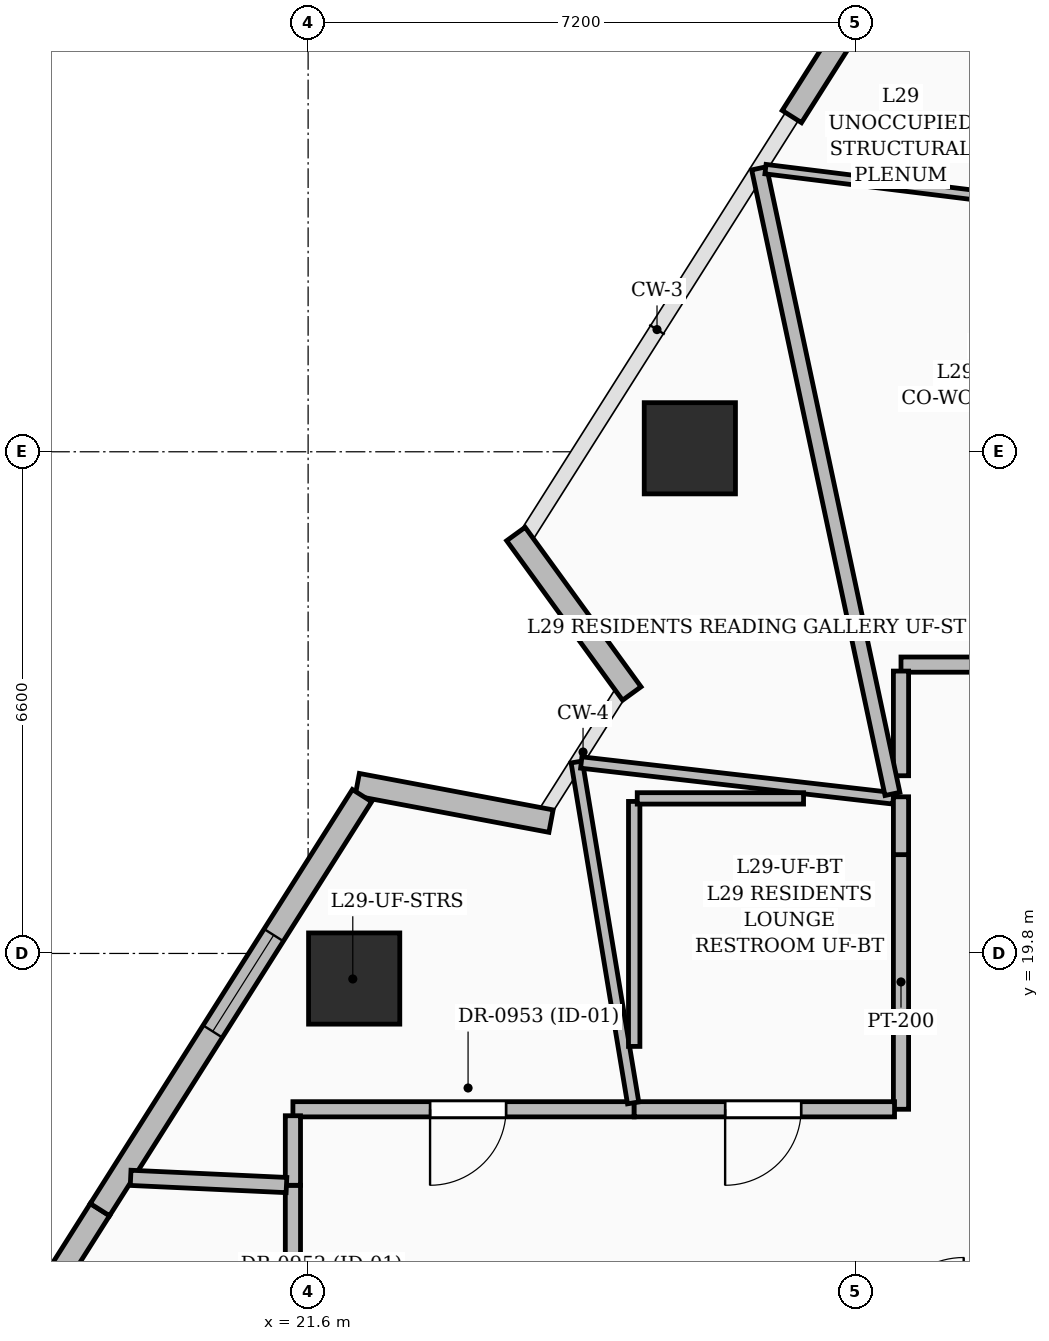
"""IFC4 building model, lengths in metres.
Left out: names, types, materials, properties, quantities, classifications, styles, units other than length and angle.
Written with IfcOpenShell. Run it as: python <this file> out.ifc"""

import sys

from ifc_helpers import new_model, si_unit, direction, frame, frame_2d, origin, origin_2d, place, context, subcontext, project, spatial, rectangle, extrude, element, fill, save


model = new_model("IFC4")
c1 = context("Model", 3, precision=1e-05, world=origin(), true_north=direction((0.0, 1.0)))
c2 = subcontext(c1, "Body", "Model", "MODEL_VIEW")
j1 = project(units=[si_unit("LENGTHUNIT", "METRE"), si_unit("PLANEANGLEUNIT", "RADIAN")], contexts=[c1])
p1 = place(None, origin())
s1 = spatial("IfcSite", under=j1, at=p1, CompositionType="ELEMENT")
p2 = place(p1, origin())
s2 = spatial("IfcBuilding", under=s1, at=p2, CompositionType="ELEMENT")
p3 = place(p2, frame((0.0, 0.0, 117.6)))
s3 = spatial("IfcBuildingStorey", under=s2, at=p3, CompositionType="ELEMENT", Elevation=117.6)
for number, where, z_axis, x_axis in (
    (1, (26.622, 26.446, 0.0), (0.0, 0.0, 1.0), (1.0, 0.0, 0.0)),
    (2, (22.206, 19.47, 0.0), (0.0, 0.0, 1.0), (1.0, 0.0, 0.0)),
):
    element("IfcColumn", number, at=place(p3, frame(where, z_axis=z_axis, x_axis=x_axis)), inside=s3, PredefinedType="COLUMN", context=c2, shape_type="SweptSolid", body=[
        extrude(rectangle(XDim=1.2, YDim=1.2, at=origin_2d()), origin(), (0.0, 0.0, 1.0), 3.6),
    ])
for number, where, z_axis, x_axis in (
    (3, (22.246, 22.021, 0.0), (0.0, 0.0, 1.0), (0.983, -0.185, 0.0)),
    (4, (25.858, 23.22, 0.0), (0.0, 0.0, 1.0), (-0.588, 0.809, 0.0)),
):
    element("IfcWall", number, at=place(p3, frame(where, z_axis=z_axis, x_axis=x_axis)), inside=s3, PredefinedType="SOLIDWALL", context=c2, shape_type="SweptSolid", body=[
        extrude(rectangle(XDim=2.594, YDim=0.3, at=frame_2d((1.297, 0.0))), origin(), (0.0, 0.0, 1.0), 2.575),
    ])
p4 = place(p3, frame((27.964, 30.81, 0.0), z_axis=(0.0, 0.0, 1.0), x_axis=(0.534892719091, 0.844919983823, 0.0)))
e5 = element("IfcWall", 5, at=p4, inside=s3, PredefinedType="SOLIDWALL", context=c2, shape_type="SweptSolid", body=[
    extrude(rectangle(XDim=6.634, YDim=0.3, at=frame_2d((3.317, 0.0))), origin(), (0.0, 0.0, 1.0), 3.35),
])
p5 = place(p4, frame((1.375, 0.0, 0.6)))
e6 = element("IfcOpeningElement", 6, at=p5, cuts=e5, PredefinedType="OPENING", context=c2, shape_type="SweptSolid", body=[
    extrude(rectangle(XDim=1.8, YDim=2.1, at=frame_2d((0.9, 1.05))), frame((0.0, 0.16, 0.0), z_axis=(0.0, -1.0, 0.0), x_axis=(1.0, 0.0, 0.0)), (0.0, 0.0, 1.0), 0.32),
])
p6 = place(p3, frame((15.262, 10.746, 0.0), z_axis=(0.0, 0.0, 1.0), x_axis=(0.534880248718, 0.844927878302, 0.0)))
e7 = element("IfcWall", 7, at=p6, inside=s3, PredefinedType="SOLIDWALL", context=c2, shape_type="SweptSolid", body=[
    extrude(rectangle(XDim=6.727, YDim=0.3, at=frame_2d((3.364, 0.0))), origin(), (0.0, 0.0, 1.0), 3.35),
])
p7 = place(p6, frame((3.975, 0.0, 0.55)))
e8 = element("IfcOpeningElement", 8, at=p7, cuts=e7, PredefinedType="OPENING", context=c2, shape_type="SweptSolid", body=[
    extrude(rectangle(XDim=1.6, YDim=2.2, at=frame_2d((0.8, 1.1))), frame((0.0, 0.16, 0.0), z_axis=(0.0, -1.0, 0.0), x_axis=(1.0, 0.0, 0.0)), (0.0, 0.0, 1.0), 0.32),
])
p8 = place(p6, frame((0.975, 0.0, 0.55)))
e9 = element("IfcOpeningElement", 9, at=p8, cuts=e7, PredefinedType="OPENING", context=c2, shape_type="SweptSolid", body=[
    extrude(rectangle(XDim=1.6, YDim=2.2, at=frame_2d((0.8, 1.1))), frame((0.0, 0.16, 0.0), z_axis=(0.0, -1.0, 0.0), x_axis=(1.0, 0.0, 0.0)), (0.0, 0.0, 1.0), 0.32),
])
p9 = place(p3, frame((18.861, 16.429, 0.0), z_axis=(0.0, 0.0, 1.0), x_axis=(0.534891708764, 0.844920623429, 0.0)))
e10 = element("IfcWall", 10, at=p9, inside=s3, PredefinedType="SOLIDWALL", context=c2, shape_type="SweptSolid", body=[
    extrude(rectangle(XDim=6.447, YDim=0.3, at=frame_2d((3.224, 0.0))), origin(), (0.0, 0.0, 1.0), 3.35),
])
p10 = place(p9, frame((2.775, 0.0, 0.6)))
e11 = element("IfcOpeningElement", 11, at=p10, cuts=e10, PredefinedType="OPENING", context=c2, shape_type="SweptSolid", body=[
    extrude(rectangle(XDim=1.5, YDim=2.1, at=frame_2d((0.75, 1.05))), frame((0.0, 0.16, 0.0), z_axis=(0.0, -1.0, 0.0), x_axis=(1.0, 0.0, 0.0)), (0.0, 0.0, 1.0), 0.32),
])
p11 = place(p3, frame((21.4, 16.75, 0.0), z_axis=(0.0, 0.0, 1.0), x_axis=(0.0, -1.0, 0.0)))
e12 = element("IfcWall", 12, at=p11, inside=s3, PredefinedType="PARTITIONING", context=c2, shape_type="SweptSolid", body=[
    extrude(rectangle(XDim=4.5, YDim=0.2, at=frame_2d((2.25, 0.0))), origin(), (0.0, 0.0, 1.0), 2.771),
])
p12 = place(p11, frame((1.69, 0.0, 0.0)))
e13 = element("IfcOpeningElement", 13, at=p12, cuts=e12, PredefinedType="OPENING", context=c2, shape_type="SweptSolid", body=[
    extrude(rectangle(XDim=1.0, YDim=2.2, at=frame_2d((0.5, 1.1))), frame((0.0, 0.11, 0.0), z_axis=(0.0, -1.0, 0.0), x_axis=(1.0, 0.0, 0.0)), (0.0, 0.0, 1.0), 0.22),
])
p13 = place(p3, frame((25.89, 17.75, 0.0), z_axis=(0.0, 0.0, 1.0), x_axis=(-1.0, 0.0, 0.0)))
e14 = element("IfcWall", 14, at=p13, inside=s3, PredefinedType="PARTITIONING", context=c2, shape_type="SweptSolid", body=[
    extrude(rectangle(XDim=4.49, YDim=0.2, at=frame_2d((2.245, 0.0))), origin(), (0.0, 0.0, 1.0), 2.372),
])
p14 = place(p13, frame((1.686, 0.0, 0.0)))
e15 = element("IfcOpeningElement", 15, at=p14, cuts=e14, PredefinedType="OPENING", context=c2, shape_type="SweptSolid", body=[
    extrude(rectangle(XDim=1.0, YDim=2.2, at=frame_2d((0.5, 1.1))), frame((0.0, 0.11, 0.0), z_axis=(0.0, -1.0, 0.0), x_axis=(1.0, 0.0, 0.0)), (0.0, 0.0, 1.0), 0.22),
])
p15 = place(p3, frame((21.4, 17.665, 0.0), z_axis=(0.0, 0.0, 1.0), x_axis=(0.0, -1.0, 0.0)))
e16 = element("IfcWall", 16, at=p15, inside=s3, PredefinedType="PARTITIONING", context=c2, shape_type="SweptSolid", body=[
    extrude(rectangle(XDim=0.915, YDim=0.2, at=frame_2d((0.458, 0.0))), origin(), (0.0, 0.0, 1.0), 2.57),
])
p16 = place(p3, frame((29.4, 21.1, 0.0), z_axis=(0.0, 0.0, 1.0), x_axis=(0.0, -1.0, 0.0)))
e17 = element("IfcWall", 17, at=p16, inside=s3, PredefinedType="PARTITIONING", context=c2, shape_type="SweptSolid", body=[
    extrude(rectangle(XDim=3.35, YDim=0.2, at=frame_2d((1.675, 0.0))), origin(), (0.0, 0.0, 1.0), 2.771),
])
p17 = place(p3, frame((29.315, 17.75, 0.0), z_axis=(0.0, 0.0, 1.0), x_axis=(-1.0, 0.0, 0.0)))
e18 = element("IfcWall", 18, at=p17, inside=s3, PredefinedType="PARTITIONING", context=c2, shape_type="SweptSolid", body=[
    extrude(rectangle(XDim=3.425, YDim=0.2, at=frame_2d((1.712, 0.0))), origin(), (0.0, 0.0, 1.0), 2.771),
])
p18 = place(p17, frame((1.229, 0.0, 0.0)))
e19 = element("IfcOpeningElement", 19, at=p18, cuts=e18, PredefinedType="OPENING", context=c2, shape_type="SweptSolid", body=[
    extrude(rectangle(XDim=1.0, YDim=2.2, at=frame_2d((0.5, 1.1))), frame((0.0, 0.11, 0.0), z_axis=(0.0, -1.0, 0.0), x_axis=(1.0, 0.0, 0.0)), (0.0, 0.0, 1.0), 0.22),
])
p19 = place(p3, frame((30.83, 23.6, 0.0), z_axis=(0.0, 0.0, 1.0), x_axis=(-1.0, 0.0, 0.0)))
e20 = element("IfcWall", 20, at=p19, inside=s3, PredefinedType="PARTITIONING", context=c2, shape_type="SweptSolid", body=[
    extrude(rectangle(XDim=1.43, YDim=0.2, at=frame_2d((0.715, 0.0))), origin(), (0.0, 0.0, 1.0), 2.372),
])
p20 = place(p3, frame((29.4, 23.515, 0.0), z_axis=(0.0, 0.0, 1.0), x_axis=(0.0, -1.0, 0.0)))
e21 = element("IfcWall", 21, at=p20, inside=s3, PredefinedType="PARTITIONING", context=c2, shape_type="SweptSolid", body=[
    extrude(rectangle(XDim=1.377, YDim=0.2, at=frame_2d((0.688, 0.0))), origin(), (0.0, 0.0, 1.0), 2.372),
])
p21 = place(p3, frame((21.315, 16.753, 0.0), z_axis=(0.0, 0.0, 1.0), x_axis=(-0.998928926466, 0.046270939795, 0.0)))
e22 = element("IfcWall", 22, at=p21, inside=s3, PredefinedType="PARTITIONING", context=c2, shape_type="SweptSolid", body=[
    extrude(rectangle(XDim=2.052, YDim=0.2, at=frame_2d((1.026, 0.0))), origin(), (0.0, 0.0, 1.0), 2.57),
])
p22 = place(p3, frame((25.876, 17.834, 0.0), z_axis=(0.0, 0.0, 1.0), x_axis=(-0.163258044995, 0.986583402832, 0.0)))
e23 = element("IfcWall", 23, at=p22, inside=s3, PredefinedType="PARTITIONING", context=c2, shape_type="SweptSolid", body=[
    extrude(rectangle(XDim=4.546, YDim=0.15, at=frame_2d((2.273, 0.0))), origin(), (0.0, 0.0, 1.0), 2.771),
])
p23 = place(p3, frame((29.3, 21.84, 0.0), z_axis=(0.0, 0.0, 1.0), x_axis=(-0.993461085134, 0.114171241234, 0.0)))
e24 = element("IfcWall", 24, at=p23, inside=s3, PredefinedType="PARTITIONING", context=c2, shape_type="SweptSolid", body=[
    extrude(rectangle(XDim=4.134, YDim=0.15, at=frame_2d((2.067, 0.0))), origin(), (0.0, 0.0, 1.0), 2.771),
])
p24 = place(p3, frame((29.288, 21.899, 0.0), z_axis=(0.0, 0.0, 1.0), x_axis=(-0.208508604507, 0.978020532426, 0.0)))
e25 = element("IfcWall", 25, at=p24, inside=s3, PredefinedType="PARTITIONING", context=c2, shape_type="SweptSolid", body=[
    extrude(rectangle(XDim=8.415, YDim=0.2, at=frame_2d((4.208, 0.0))), origin(), (0.0, 0.0, 1.0), 2.372),
])
p25 = place(p3, frame((27.617, 30.118, 0.0), z_axis=(0.0, 0.0, 1.0), x_axis=(0.992397517991, -0.123073824536, 0.0)))
e26 = element("IfcWall", 26, at=p25, inside=s3, PredefinedType="PARTITIONING", context=c2, shape_type="SweptSolid", body=[
    extrude(rectangle(XDim=3.19, YDim=0.125, at=frame_2d((1.595, 0.0))), origin(), (0.0, 0.0, 1.0), 2.57),
])
p26 = place(p3, frame((25.89, 18.577, 0.0), z_axis=(0.0, 0.0, 1.0), x_axis=(0.0, 1.0, 0.0)))
e27 = element("IfcWall", 27, at=p26, inside=s3, PredefinedType="PARTITIONING", context=c2, shape_type="SweptSolid", body=[
    extrude(rectangle(XDim=3.223, YDim=0.15, at=frame_2d((1.612, 0.0))), origin(), (0.0, 0.0, 1.0), 2.771),
])
p27 = place(p3, frame((25.93, 21.84, 0.0), z_axis=(0.0, 0.0, 1.0), x_axis=(1.0, 0.0, 0.0)))
e28 = element("IfcWall", 28, at=p27, inside=s3, PredefinedType="PARTITIONING", context=c2, shape_type="SweptSolid", body=[
    extrude(rectangle(XDim=2.188, YDim=0.15, at=frame_2d((1.094, 0.0))), origin(), (0.0, 0.0, 1.0), 2.771),
])
p28 = place(p3, frame((29.4, 21.861, 0.0), z_axis=(0.0, 0.0, 1.0), x_axis=(0.0, -1.0, 0.0)))
e29 = element("IfcWall", 29, at=p28, inside=s3, PredefinedType="PARTITIONING", context=c2, shape_type="SweptSolid", body=[
    extrude(rectangle(XDim=0.761, YDim=0.2, at=frame_2d((0.38, 0.0))), origin(), (0.0, 0.0, 1.0), 2.372),
])
p29 = place(p10, origin())
e30 = element("IfcWindow", 30, at=p29, inside=s3, PartitioningType="SINGLE_PANEL", PredefinedType="WINDOW", context=c2, shape_type="SweptSolid", body=[
    extrude(rectangle(XDim=1.5, YDim=2.1, at=frame_2d((0.75, 1.05))), frame((0.0, 0.03, 0.0), z_axis=(0.0, -1.0, 0.0), x_axis=(1.0, 0.0, 0.0)), (0.0, 0.0, 1.0), 0.06),
])
fill(e11, e30)
p30 = place(p14, origin())
e31 = element("IfcDoor", 31, at=p30, inside=s3, OperationType="SINGLE_SWING_RIGHT", PredefinedType="DOOR", context=c2, shape_type="SweptSolid", body=[
    extrude(rectangle(XDim=1.0, YDim=2.2, at=frame_2d((0.5, 1.1))), frame((0.0, 0.025, 0.0), z_axis=(0.0, -1.0, 0.0), x_axis=(1.0, 0.0, 0.0)), (0.0, 0.0, 1.0), 0.05),
])
fill(e15, e31)
p31 = place(p18, origin())
e32 = element("IfcDoor", 32, at=p31, inside=s3, OperationType="SINGLE_SWING_RIGHT", PredefinedType="DOOR", context=c2, shape_type="SweptSolid", body=[
    extrude(rectangle(XDim=1.0, YDim=2.2, at=frame_2d((0.5, 1.1))), frame((0.0, 0.025, 0.0), z_axis=(0.0, -1.0, 0.0), x_axis=(1.0, 0.0, 0.0)), (0.0, 0.0, 1.0), 0.05),
])
fill(e19, e32)
save(model, sys.argv[1])
